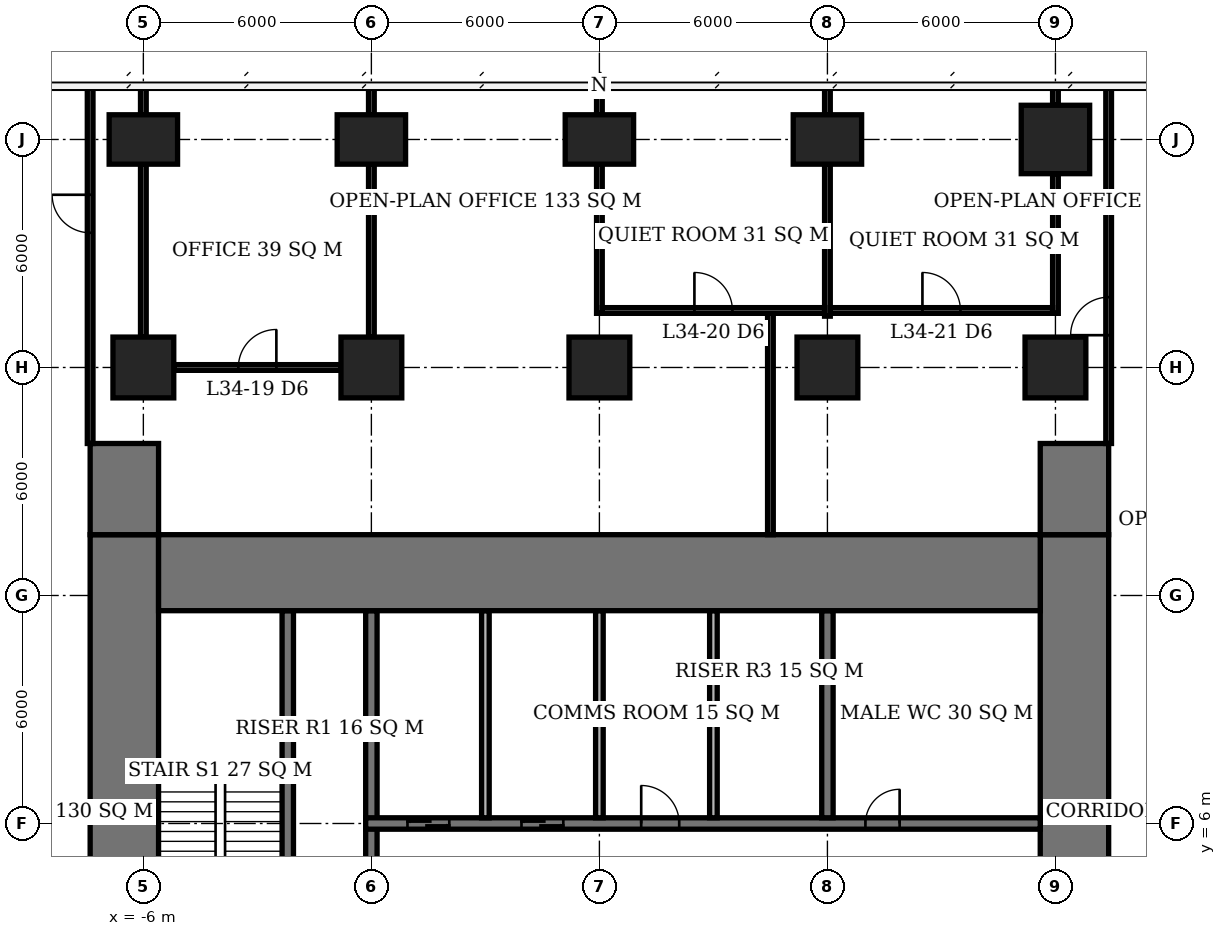
"""IFC4 building model, lengths in metres.
Left out: names, types, materials, properties, quantities, classifications, styles, units other than length and angle.
Written with IfcOpenShell. Run it as: python <this file> out.ifc"""

import sys

from ifc_helpers import new_model, si_unit, direction, frame, frame_2d, origin, origin_2d, place, context, subcontext, project, spatial, rectangle, extrude, element, fill, save


model = new_model("IFC4")
c1 = context("Model", 3, precision=1e-05, world=origin(), true_north=direction((0.0, 1.0)))
c2 = subcontext(c1, "Body", "Model", "MODEL_VIEW")
j1 = project(units=[si_unit("LENGTHUNIT", "METRE"), si_unit("PLANEANGLEUNIT", "RADIAN")], contexts=[c1])
p1 = place(None, origin())
s1 = spatial("IfcSite", under=j1, at=p1, CompositionType="ELEMENT")
p2 = place(p1, origin())
s2 = spatial("IfcBuilding", under=s1, at=p2, CompositionType="ELEMENT")
p3 = place(p2, frame((0.0, 0.0, 140.6)))
s3 = spatial("IfcBuildingStorey", under=s2, at=p3, CompositionType="ELEMENT", Elevation=140.6)
p4 = place(p3, frame((-6.0, 18.0, 0.0), z_axis=(0.0, 0.0, 1.0), x_axis=(1.0, 0.0, 0.0)))
e1 = element("IfcColumn", 1, at=p4, inside=s3, PredefinedType="COLUMN", context=c2, shape_type="SweptSolid", body=[
    extrude(rectangle(XDim=1.6, YDim=1.6, at=origin_2d()), origin(), (0.0, 0.0, 1.0), 3.9),
])
p5 = place(p3, frame((-6.0, 24.0, 0.0), z_axis=(0.0, 0.0, 1.0), x_axis=(1.0, 0.0, 0.0)))
e2 = element("IfcColumn", 2, at=p5, inside=s3, PredefinedType="COLUMN", context=c2, shape_type="SweptSolid", body=[
    extrude(rectangle(XDim=1.8, YDim=1.3, at=origin_2d()), origin(), (0.0, 0.0, 1.0), 3.9),
])
p6 = place(p3, frame((0.0, 18.0, 0.0), z_axis=(0.0, 0.0, 1.0), x_axis=(1.0, 0.0, 0.0)))
e3 = element("IfcColumn", 3, at=p6, inside=s3, PredefinedType="COLUMN", context=c2, shape_type="SweptSolid", body=[
    extrude(rectangle(XDim=1.6, YDim=1.6, at=origin_2d()), origin(), (0.0, 0.0, 1.0), 3.9),
])
p7 = place(p3, frame((0.0, 24.0, 0.0), z_axis=(0.0, 0.0, 1.0), x_axis=(1.0, 0.0, 0.0)))
e4 = element("IfcColumn", 4, at=p7, inside=s3, PredefinedType="COLUMN", context=c2, shape_type="SweptSolid", body=[
    extrude(rectangle(XDim=1.8, YDim=1.3, at=origin_2d()), origin(), (0.0, 0.0, 1.0), 3.9),
])
p8 = place(p3, frame((6.0, 18.0, 0.0), z_axis=(0.0, 0.0, 1.0), x_axis=(1.0, 0.0, 0.0)))
e5 = element("IfcColumn", 5, at=p8, inside=s3, PredefinedType="COLUMN", context=c2, shape_type="SweptSolid", body=[
    extrude(rectangle(XDim=1.6, YDim=1.6, at=origin_2d()), origin(), (0.0, 0.0, 1.0), 3.9),
])
p9 = place(p3, frame((6.0, 24.0, 0.0), z_axis=(0.0, 0.0, 1.0), x_axis=(1.0, 0.0, 0.0)))
e6 = element("IfcColumn", 6, at=p9, inside=s3, PredefinedType="COLUMN", context=c2, shape_type="SweptSolid", body=[
    extrude(rectangle(XDim=1.8, YDim=1.3, at=origin_2d()), origin(), (0.0, 0.0, 1.0), 3.9),
])
p10 = place(p3, frame((12.0, 18.0, 0.0), z_axis=(0.0, 0.0, 1.0), x_axis=(1.0, 0.0, 0.0)))
e7 = element("IfcColumn", 7, at=p10, inside=s3, PredefinedType="COLUMN", context=c2, shape_type="SweptSolid", body=[
    extrude(rectangle(XDim=1.6, YDim=1.6, at=origin_2d()), origin(), (0.0, 0.0, 1.0), 3.9),
])
p11 = place(p3, frame((12.0, 24.0, 0.0), z_axis=(0.0, 0.0, 1.0), x_axis=(1.0, 0.0, 0.0)))
e8 = element("IfcColumn", 8, at=p11, inside=s3, PredefinedType="COLUMN", context=c2, shape_type="SweptSolid", body=[
    extrude(rectangle(XDim=1.8, YDim=1.3, at=origin_2d()), origin(), (0.0, 0.0, 1.0), 3.9),
])
p12 = place(p3, frame((18.0, 18.0, 0.0), z_axis=(0.0, 0.0, 1.0), x_axis=(1.0, 0.0, 0.0)))
e9 = element("IfcColumn", 9, at=p12, inside=s3, PredefinedType="COLUMN", context=c2, shape_type="SweptSolid", body=[
    extrude(rectangle(XDim=1.6, YDim=1.6, at=origin_2d()), origin(), (0.0, 0.0, 1.0), 3.9),
])
p13 = place(p3, frame((18.0, 24.0, 0.0), z_axis=(0.0, 0.0, 1.0), x_axis=(1.0, 0.0, 0.0)))
e10 = element("IfcColumn", 10, at=p13, inside=s3, PredefinedType="COLUMN", context=c2, shape_type="SweptSolid", body=[
    extrude(rectangle(XDim=1.8, YDim=1.8, at=origin_2d()), origin(), (0.0, 0.0, 1.0), 3.9),
])
p14 = place(p3, frame((-5.6, 12.6, 0.0), z_axis=(0.0, 0.0, 1.0), x_axis=(1.0, 0.0, 0.0)))
e11 = element("IfcWall", 11, at=p14, inside=s3, PredefinedType="SHEAR", context=c2, shape_type="SweptSolid", body=[
    extrude(rectangle(XDim=23.2, YDim=2.0, at=frame_2d((11.6, 0.0))), origin(), (0.0, 0.0, 1.0), 3.9),
])
p15 = place(p3, frame((-6.5, -7.6, 0.0), z_axis=(0.0, 0.0, 1.0), x_axis=(0.0, 1.0, 0.0)))
e12 = element("IfcWall", 12, at=p15, inside=s3, PredefinedType="SHEAR", context=c2, shape_type="SweptSolid", body=[
    extrude(rectangle(XDim=21.2, YDim=1.8, at=frame_2d((10.6, 0.0))), origin(), (0.0, 0.0, 1.0), 3.9),
])
p16 = place(p15, frame((7.8, 0.0, 0.0)))
e13 = element("IfcOpeningElement", 13, at=p16, cuts=e12, PredefinedType="OPENING", context=c2, shape_type="SweptSolid", body=[
    extrude(rectangle(XDim=1.8, YDim=2.4, at=frame_2d((0.9, 1.2))), frame((0.0, 0.91, 0.0), z_axis=(0.0, -1.0, 0.0), x_axis=(1.0, 0.0, 0.0)), (0.0, 0.0, 1.0), 1.82),
])
p17 = place(p3, frame((18.5, -7.6, 0.0), z_axis=(0.0, 0.0, 1.0), x_axis=(0.0, 1.0, 0.0)))
e14 = element("IfcWall", 14, at=p17, inside=s3, PredefinedType="SHEAR", context=c2, shape_type="SweptSolid", body=[
    extrude(rectangle(XDim=21.2, YDim=1.8, at=frame_2d((10.6, 0.0))), origin(), (0.0, 0.0, 1.0), 3.9),
])
p18 = place(p17, frame((9.2, 0.0, 0.0)))
e15 = element("IfcOpeningElement", 15, at=p18, cuts=e14, PredefinedType="OPENING", context=c2, shape_type="SweptSolid", body=[
    extrude(rectangle(XDim=1.8, YDim=2.4, at=frame_2d((0.9, 1.2))), frame((0.0, 0.91, 0.0), z_axis=(0.0, -1.0, 0.0), x_axis=(1.0, 0.0, 0.0)), (0.0, 0.0, 1.0), 1.82),
])
for number, where, z_axis, x_axis in (
    (16, (-6.5, 13.6, 0.0), (0.0, 0.0, 1.0), (0.0, 1.0, 0.0)),
    (17, (18.5, 13.6, 0.0), (0.0, 0.0, 1.0), (0.0, 1.0, 0.0)),
):
    element("IfcWall", number, at=place(p3, frame(where, z_axis=z_axis, x_axis=x_axis)), inside=s3, PredefinedType="SHEAR", context=c2, shape_type="SweptSolid", body=[
        extrude(rectangle(XDim=2.4, YDim=1.8, at=frame_2d((1.2, 0.0))), origin(), (0.0, 0.0, 1.0), 3.9),
    ])
p19 = place(p3, frame((-0.15, 6.0, 0.0), z_axis=(0.0, 0.0, 1.0), x_axis=(1.0, 0.0, 0.0)))
e18 = element("IfcWall", 18, at=p19, inside=s3, PredefinedType="SHEAR", context=c2, shape_type="SweptSolid", body=[
    extrude(rectangle(XDim=17.75, YDim=0.3, at=frame_2d((8.875, 0.0))), origin(), (0.0, 0.0, 1.0), 3.9),
])
p20 = place(p19, frame((13.15, 0.0, 0.0)))
e19 = element("IfcOpeningElement", 19, at=p20, cuts=e18, PredefinedType="OPENING", context=c2, shape_type="SweptSolid", body=[
    extrude(rectangle(XDim=0.9, YDim=2.1, at=frame_2d((0.45, 1.05))), frame((0.0, 0.16, 0.0), z_axis=(0.0, -1.0, 0.0), x_axis=(1.0, 0.0, 0.0)), (0.0, 0.0, 1.0), 0.32),
])
p21 = place(p19, frame((7.25, 0.0, 0.0)))
e20 = element("IfcOpeningElement", 20, at=p21, cuts=e18, PredefinedType="OPENING", context=c2, shape_type="SweptSolid", body=[
    extrude(rectangle(XDim=1.0, YDim=2.1, at=frame_2d((0.5, 1.05))), frame((0.0, 0.16, 0.0), z_axis=(0.0, -1.0, 0.0), x_axis=(1.0, 0.0, 0.0)), (0.0, 0.0, 1.0), 0.32),
])
p22 = place(p19, frame((1.1, 0.0, 0.0)))
e21 = element("IfcOpeningElement", 21, at=p22, cuts=e18, PredefinedType="OPENING", context=c2, shape_type="SweptSolid", body=[
    extrude(rectangle(XDim=1.1, YDim=2.1, at=frame_2d((0.55, 1.05))), frame((0.0, 0.16, 0.0), z_axis=(0.0, -1.0, 0.0), x_axis=(1.0, 0.0, 0.0)), (0.0, 0.0, 1.0), 0.32),
])
p23 = place(p19, frame((4.1, 0.0, 0.0)))
e22 = element("IfcOpeningElement", 22, at=p23, cuts=e18, PredefinedType="OPENING", context=c2, shape_type="SweptSolid", body=[
    extrude(rectangle(XDim=1.1, YDim=2.1, at=frame_2d((0.55, 1.05))), frame((0.0, 0.16, 0.0), z_axis=(0.0, -1.0, 0.0), x_axis=(1.0, 0.0, 0.0)), (0.0, 0.0, 1.0), 0.32),
])
p24 = place(p3, frame((0.0, 3.15, 0.0), z_axis=(0.0, 0.0, 1.0), x_axis=(0.0, 1.0, 0.0)))
e23 = element("IfcWall", 23, at=p24, inside=s3, PredefinedType="SHEAR", context=c2, shape_type="SweptSolid", body=[
    extrude(rectangle(XDim=8.45, YDim=0.3, at=frame_2d((4.225, 0.0))), origin(), (0.0, 0.0, 1.0), 3.9),
])
p25 = place(p3, frame((12.0, 6.15, 0.0), z_axis=(0.0, 0.0, 1.0), x_axis=(0.0, 1.0, 0.0)))
e24 = element("IfcWall", 24, at=p25, inside=s3, PredefinedType="SHEAR", context=c2, shape_type="SweptSolid", body=[
    extrude(rectangle(XDim=5.45, YDim=0.3, at=frame_2d((2.725, 0.0))), origin(), (0.0, 0.0, 1.0), 3.9),
])
p26 = place(p3, frame((-2.2, 3.15, 0.0), z_axis=(0.0, 0.0, 1.0), x_axis=(0.0, 1.0, 0.0)))
e25 = element("IfcWall", 25, at=p26, inside=s3, PredefinedType="SHEAR", context=c2, shape_type="SweptSolid", body=[
    extrude(rectangle(XDim=8.45, YDim=0.3, at=frame_2d((4.225, 0.0))), origin(), (0.0, 0.0, 1.0), 3.9),
])
for number, where, z_axis, x_axis in (
    (26, (3.0, 6.15, 0.0), (0.0, 0.0, 1.0), (0.0, 1.0, 0.0)),
    (27, (6.0, 6.15, 0.0), (0.0, 0.0, 1.0), (0.0, 1.0, 0.0)),
    (28, (9.0, 6.15, 0.0), (0.0, 0.0, 1.0), (0.0, 1.0, 0.0)),
):
    element("IfcWall", number, at=place(p3, frame(where, z_axis=z_axis, x_axis=x_axis)), inside=s3, PredefinedType="SOLIDWALL", context=c2, shape_type="SweptSolid", body=[
        extrude(rectangle(XDim=5.45, YDim=0.2, at=frame_2d((2.725, 0.0))), origin(), (0.0, 0.0, 1.0), 3.9),
    ])
p27 = place(p3, frame((-5.2, 18.0, 0.0), z_axis=(0.0, 0.0, 1.0), x_axis=(1.0, 0.0, 0.0)))
e29 = element("IfcWall", 29, at=p27, inside=s3, PredefinedType="PARTITIONING", context=c2, shape_type="SweptSolid", body=[
    extrude(rectangle(XDim=4.4, YDim=0.15, at=frame_2d((2.2, 0.0))), origin(), (0.0, 0.0, 1.0), 3.65),
])
p28 = place(p27, frame((1.7, 0.0, 0.0)))
e30 = element("IfcOpeningElement", 30, at=p28, cuts=e29, PredefinedType="OPENING", context=c2, shape_type="SweptSolid", body=[
    extrude(rectangle(XDim=1.0, YDim=2.1, at=frame_2d((0.5, 1.05))), frame((0.0, 0.085, 0.0), z_axis=(0.0, -1.0, 0.0), x_axis=(1.0, 0.0, 0.0)), (0.0, 0.0, 1.0), 0.17),
])
p29 = place(p3, frame((6.075, 19.5, 0.0), z_axis=(0.0, 0.0, 1.0), x_axis=(1.0, 0.0, 0.0)))
e31 = element("IfcWall", 31, at=p29, inside=s3, PredefinedType="PARTITIONING", context=c2, shape_type="SweptSolid", body=[
    extrude(rectangle(XDim=5.85, YDim=0.15, at=frame_2d((2.925, 0.0))), origin(), (0.0, 0.0, 1.0), 3.65),
])
p30 = place(p29, frame((2.425, 0.0, 0.0)))
e32 = element("IfcOpeningElement", 32, at=p30, cuts=e31, PredefinedType="OPENING", context=c2, shape_type="SweptSolid", body=[
    extrude(rectangle(XDim=1.0, YDim=2.1, at=frame_2d((0.5, 1.05))), frame((0.0, 0.085, 0.0), z_axis=(0.0, -1.0, 0.0), x_axis=(1.0, 0.0, 0.0)), (0.0, 0.0, 1.0), 0.17),
])
p31 = place(p3, frame((12.075, 19.5, 0.0), z_axis=(0.0, 0.0, 1.0), x_axis=(1.0, 0.0, 0.0)))
e33 = element("IfcWall", 33, at=p31, inside=s3, PredefinedType="PARTITIONING", context=c2, shape_type="SweptSolid", body=[
    extrude(rectangle(XDim=5.85, YDim=0.15, at=frame_2d((2.925, 0.0))), origin(), (0.0, 0.0, 1.0), 3.65),
])
p32 = place(p31, frame((2.425, 0.0, 0.0)))
e34 = element("IfcOpeningElement", 34, at=p32, cuts=e33, PredefinedType="OPENING", context=c2, shape_type="SweptSolid", body=[
    extrude(rectangle(XDim=1.0, YDim=2.1, at=frame_2d((0.5, 1.05))), frame((0.0, 0.085, 0.0), z_axis=(0.0, -1.0, 0.0), x_axis=(1.0, 0.0, 0.0)), (0.0, 0.0, 1.0), 0.17),
])
p33 = place(p3, frame((-6.0, 18.8, 0.0), z_axis=(0.0, 0.0, 1.0), x_axis=(0.0, 1.0, 0.0)))
e35 = element("IfcWall", 35, at=p33, inside=s3, PredefinedType="PARTITIONING", context=c2, shape_type="SweptSolid", body=[
    extrude(rectangle(XDim=4.55, YDim=0.15, at=frame_2d((2.275, 0.0))), origin(), (0.0, 0.0, 1.0), 3.65),
])
p34 = place(p3, frame((-6.0, 24.65, 0.0), z_axis=(0.0, 0.0, 1.0), x_axis=(0.0, 1.0, 0.0)))
e36 = element("IfcWall", 36, at=p34, inside=s3, PredefinedType="PARTITIONING", context=c2, shape_type="SweptSolid", body=[
    extrude(rectangle(XDim=0.75, YDim=0.15, at=frame_2d((0.375, 0.0))), origin(), (0.0, 0.0, 1.0), 3.65),
])
p35 = place(p3, frame((0.0, 18.8, 0.0), z_axis=(0.0, 0.0, 1.0), x_axis=(0.0, 1.0, 0.0)))
e37 = element("IfcWall", 37, at=p35, inside=s3, PredefinedType="PARTITIONING", context=c2, shape_type="SweptSolid", body=[
    extrude(rectangle(XDim=4.55, YDim=0.15, at=frame_2d((2.275, 0.0))), origin(), (0.0, 0.0, 1.0), 3.65),
])
p36 = place(p3, frame((0.0, 24.65, 0.0), z_axis=(0.0, 0.0, 1.0), x_axis=(0.0, 1.0, 0.0)))
e38 = element("IfcWall", 38, at=p36, inside=s3, PredefinedType="PARTITIONING", context=c2, shape_type="SweptSolid", body=[
    extrude(rectangle(XDim=0.75, YDim=0.15, at=frame_2d((0.375, 0.0))), origin(), (0.0, 0.0, 1.0), 3.65),
])
p37 = place(p3, frame((6.0, 19.425, 0.0), z_axis=(0.0, 0.0, 1.0), x_axis=(0.0, 1.0, 0.0)))
e39 = element("IfcWall", 39, at=p37, inside=s3, PredefinedType="PARTITIONING", context=c2, shape_type="SweptSolid", body=[
    extrude(rectangle(XDim=3.925, YDim=0.15, at=frame_2d((1.962, 0.0))), origin(), (0.0, 0.0, 1.0), 3.65),
])
p38 = place(p3, frame((6.0, 24.65, 0.0), z_axis=(0.0, 0.0, 1.0), x_axis=(0.0, 1.0, 0.0)))
e40 = element("IfcWall", 40, at=p38, inside=s3, PredefinedType="PARTITIONING", context=c2, shape_type="SweptSolid", body=[
    extrude(rectangle(XDim=0.7, YDim=0.15, at=frame_2d((0.35, 0.0))), origin(), (0.0, 0.0, 1.0), 3.65),
])
p39 = place(p3, frame((12.0, 19.35, 0.0), z_axis=(0.0, 0.0, 1.0), x_axis=(0.0, 1.0, 0.0)))
e41 = element("IfcWall", 41, at=p39, inside=s3, PredefinedType="PARTITIONING", context=c2, shape_type="SweptSolid", body=[
    extrude(rectangle(XDim=4.0, YDim=0.15, at=frame_2d((2.0, 0.0))), origin(), (0.0, 0.0, 1.0), 3.65),
])
p40 = place(p3, frame((12.0, 24.65, 0.0), z_axis=(0.0, 0.0, 1.0), x_axis=(0.0, 1.0, 0.0)))
e42 = element("IfcWall", 42, at=p40, inside=s3, PredefinedType="PARTITIONING", context=c2, shape_type="SweptSolid", body=[
    extrude(rectangle(XDim=0.75, YDim=0.15, at=frame_2d((0.375, 0.0))), origin(), (0.0, 0.0, 1.0), 3.65),
])
p41 = place(p3, frame((18.0, 19.425, 0.0), z_axis=(0.0, 0.0, 1.0), x_axis=(0.0, 1.0, 0.0)))
e43 = element("IfcWall", 43, at=p41, inside=s3, PredefinedType="PARTITIONING", context=c2, shape_type="SweptSolid", body=[
    extrude(rectangle(XDim=3.675, YDim=0.15, at=frame_2d((1.837, 0.0))), origin(), (0.0, 0.0, 1.0), 3.65),
])
p42 = place(p3, frame((18.0, 24.9, 0.0), z_axis=(0.0, 0.0, 1.0), x_axis=(0.0, 1.0, 0.0)))
e44 = element("IfcWall", 44, at=p42, inside=s3, PredefinedType="PARTITIONING", context=c2, shape_type="SweptSolid", body=[
    extrude(rectangle(XDim=0.5, YDim=0.15, at=frame_2d((0.25, 0.0))), origin(), (0.0, 0.0, 1.0), 3.65),
])
p43 = place(p3, frame((-7.4, 16.0, 0.0), z_axis=(0.0, 0.0, 1.0), x_axis=(0.0, 1.0, 0.0)))
e45 = element("IfcWall", 45, at=p43, inside=s3, PredefinedType="PARTITIONING", context=c2, shape_type="SweptSolid", body=[
    extrude(rectangle(XDim=9.4, YDim=0.15, at=frame_2d((4.7, 0.0))), origin(), (0.0, 0.0, 1.0), 3.65),
])
p44 = place(p43, frame((5.545, 0.0, 0.0)))
e46 = element("IfcOpeningElement", 46, at=p44, cuts=e45, PredefinedType="OPENING", context=c2, shape_type="SweptSolid", body=[
    extrude(rectangle(XDim=1.0, YDim=2.1, at=frame_2d((0.5, 1.05))), frame((0.0, 0.085, 0.0), z_axis=(0.0, -1.0, 0.0), x_axis=(1.0, 0.0, 0.0)), (0.0, 0.0, 1.0), 0.17),
])
p45 = place(p3, frame((10.5, 13.6, 0.0), z_axis=(0.0, 0.0, 1.0), x_axis=(0.0, 1.0, 0.0)))
e47 = element("IfcWall", 47, at=p45, inside=s3, PredefinedType="PARTITIONING", context=c2, shape_type="SweptSolid", body=[
    extrude(rectangle(XDim=5.825, YDim=0.15, at=frame_2d((2.913, 0.0))), origin(), (0.0, 0.0, 1.0), 3.65),
])
p46 = place(p3, frame((19.4, 16.0, 0.0), z_axis=(0.0, 0.0, 1.0), x_axis=(0.0, 1.0, 0.0)))
e48 = element("IfcWall", 48, at=p46, inside=s3, PredefinedType="PARTITIONING", context=c2, shape_type="SweptSolid", body=[
    extrude(rectangle(XDim=9.4, YDim=0.15, at=frame_2d((4.7, 0.0))), origin(), (0.0, 0.0, 1.0), 3.65),
])
p47 = place(p46, frame((2.85, 0.0, 0.0)))
e49 = element("IfcOpeningElement", 49, at=p47, cuts=e48, PredefinedType="OPENING", context=c2, shape_type="SweptSolid", body=[
    extrude(rectangle(XDim=1.0, YDim=2.1, at=frame_2d((0.5, 1.05))), frame((0.0, 0.085, 0.0), z_axis=(0.0, -1.0, 0.0), x_axis=(1.0, 0.0, 0.0)), (0.0, 0.0, 1.0), 0.17),
])
p48 = place(p20, origin())
e50 = element("IfcDoor", 50, at=p48, inside=s3, OperationType="SINGLE_SWING_RIGHT", PredefinedType="DOOR", context=c2, shape_type="SweptSolid", body=[
    extrude(rectangle(XDim=0.9, YDim=2.1, at=frame_2d((0.45, 1.05))), frame((0.0, 0.025, 0.0), z_axis=(0.0, -1.0, 0.0), x_axis=(1.0, 0.0, 0.0)), (0.0, 0.0, 1.0), 0.05),
])
fill(e19, e50)
p49 = place(p21, origin())
e51 = element("IfcDoor", 51, at=p49, inside=s3, OperationType="SINGLE_SWING_LEFT", PredefinedType="DOOR", context=c2, shape_type="SweptSolid", body=[
    extrude(rectangle(XDim=1.0, YDim=2.1, at=frame_2d((0.5, 1.05))), frame((0.0, 0.025, 0.0), z_axis=(0.0, -1.0, 0.0), x_axis=(1.0, 0.0, 0.0)), (0.0, 0.0, 1.0), 0.05),
])
fill(e20, e51)
p50 = place(p22, origin())
e52 = element("IfcDoor", 52, at=p50, inside=s3, OperationType="DOUBLE_DOOR_SLIDING", PredefinedType="USERDEFINED", context=c2, shape_type="SweptSolid", body=[
    extrude(rectangle(XDim=1.1, YDim=2.1, at=frame_2d((0.55, 1.05))), frame((0.0, 0.025, 0.0), z_axis=(0.0, -1.0, 0.0), x_axis=(1.0, 0.0, 0.0)), (0.0, 0.0, 1.0), 0.05),
])
fill(e21, e52)
p51 = place(p23, origin())
e53 = element("IfcDoor", 53, at=p51, inside=s3, OperationType="DOUBLE_DOOR_SLIDING", PredefinedType="USERDEFINED", context=c2, shape_type="SweptSolid", body=[
    extrude(rectangle(XDim=1.1, YDim=2.1, at=frame_2d((0.55, 1.05))), frame((0.0, 0.025, 0.0), z_axis=(0.0, -1.0, 0.0), x_axis=(1.0, 0.0, 0.0)), (0.0, 0.0, 1.0), 0.05),
])
fill(e22, e53)
p52 = place(p28, origin())
e54 = element("IfcDoor", 54, at=p52, inside=s3, OperationType="SINGLE_SWING_RIGHT", PredefinedType="DOOR", context=c2, shape_type="SweptSolid", body=[
    extrude(rectangle(XDim=1.0, YDim=2.1, at=frame_2d((0.5, 1.05))), frame((0.0, 0.025, 0.0), z_axis=(0.0, -1.0, 0.0), x_axis=(1.0, 0.0, 0.0)), (0.0, 0.0, 1.0), 0.05),
])
fill(e30, e54)
p53 = place(p30, origin())
e55 = element("IfcDoor", 55, at=p53, inside=s3, OperationType="SINGLE_SWING_LEFT", PredefinedType="DOOR", context=c2, shape_type="SweptSolid", body=[
    extrude(rectangle(XDim=1.0, YDim=2.1, at=frame_2d((0.5, 1.05))), frame((0.0, 0.025, 0.0), z_axis=(0.0, -1.0, 0.0), x_axis=(1.0, 0.0, 0.0)), (0.0, 0.0, 1.0), 0.05),
])
fill(e32, e55)
p54 = place(p32, origin())
e56 = element("IfcDoor", 56, at=p54, inside=s3, OperationType="SINGLE_SWING_LEFT", PredefinedType="DOOR", context=c2, shape_type="SweptSolid", body=[
    extrude(rectangle(XDim=1.0, YDim=2.1, at=frame_2d((0.5, 1.05))), frame((0.0, 0.025, 0.0), z_axis=(0.0, -1.0, 0.0), x_axis=(1.0, 0.0, 0.0)), (0.0, 0.0, 1.0), 0.05),
])
fill(e34, e56)
p55 = place(p47, origin())
e57 = element("IfcDoor", 57, at=p55, inside=s3, OperationType="SINGLE_SWING_LEFT", PredefinedType="DOOR", context=c2, shape_type="SweptSolid", body=[
    extrude(rectangle(XDim=1.0, YDim=2.1, at=frame_2d((0.5, 1.05))), frame((0.0, 0.025, 0.0), z_axis=(0.0, -1.0, 0.0), x_axis=(1.0, 0.0, 0.0)), (0.0, 0.0, 1.0), 0.05),
])
fill(e49, e57)
p56 = place(p44, origin())
e58 = element("IfcDoor", 58, at=p56, inside=s3, OperationType="SINGLE_SWING_RIGHT", PredefinedType="DOOR", context=c2, shape_type="SweptSolid", body=[
    extrude(rectangle(XDim=1.0, YDim=2.1, at=frame_2d((0.5, 1.05))), frame((0.0, 0.025, 0.0), z_axis=(0.0, -1.0, 0.0), x_axis=(1.0, 0.0, 0.0)), (0.0, 0.0, 1.0), 0.05),
])
fill(e46, e58)
save(model, sys.argv[1])
